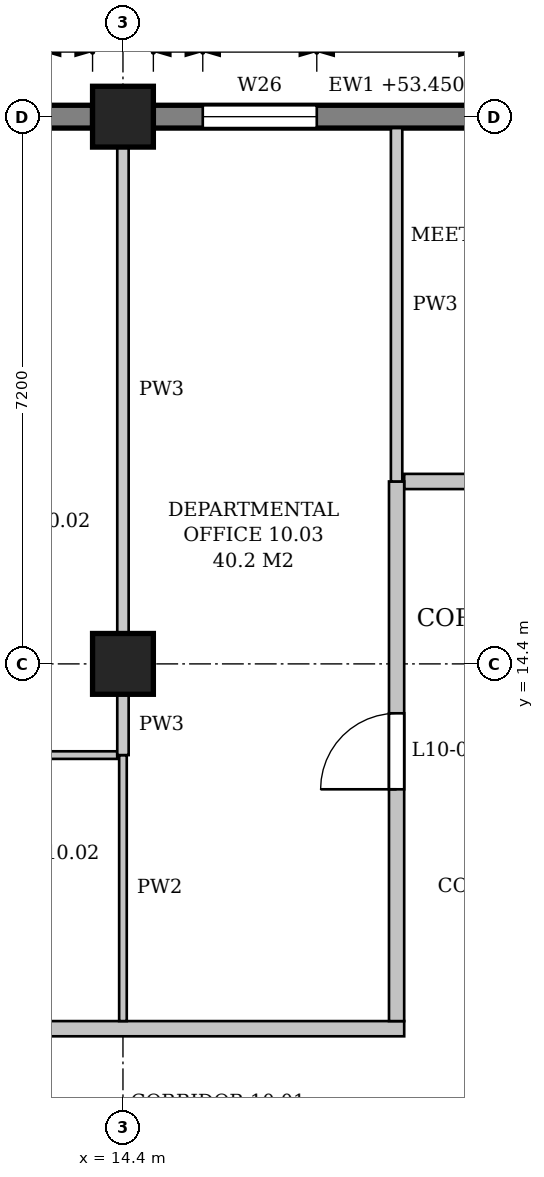
"""IFC4 building model, lengths in metres.
Left out: names, types, materials, properties, quantities, classifications, styles, units other than length and angle.
Written with IfcOpenShell. Run it as: python <this file> out.ifc"""

import sys

from ifc_helpers import new_model, si_unit, direction, frame, frame_2d, origin, origin_2d, place, context, subcontext, project, spatial, polyline, rectangle, outline, extrude, element, fill, save


model = new_model("IFC4")
c1 = context("Model", 3, precision=1e-05, world=origin(), true_north=direction((0.0, 1.0)))
c2 = subcontext(c1, "Body", "Model", "MODEL_VIEW")
j1 = project(units=[si_unit("LENGTHUNIT", "METRE"), si_unit("PLANEANGLEUNIT", "RADIAN")], contexts=[c1])
p1 = place(None, origin())
s1 = spatial("IfcSite", under=j1, at=p1, CompositionType="ELEMENT")
p2 = place(p1, origin())
s2 = spatial("IfcBuilding", under=s1, at=p2, CompositionType="ELEMENT")
p3 = place(p2, frame((0.0, 0.0, 49.8)))
s3 = spatial("IfcBuildingStorey", under=s2, at=p3, CompositionType="ELEMENT", Elevation=49.8)
for number, where, z_axis, x_axis in (
    (1, (14.4, 14.4, 0.0), (0.0, 0.0, 1.0), (1.0, 0.0, 0.0)),
    (2, (14.4, 21.6, 0.0), (0.0, 0.0, 1.0), (1.0, 0.0, 0.0)),
):
    element("IfcColumn", number, at=place(p3, frame(where, z_axis=z_axis, x_axis=x_axis)), inside=s3, PredefinedType="COLUMN", context=c2, shape_type="SweptSolid", body=[
        extrude(rectangle(XDim=0.8, YDim=0.8, at=origin_2d()), origin(), (0.0, 0.0, 1.0), 4.5),
    ])
p4 = place(p3, frame((21.2, 21.6, 0.0), z_axis=(0.0, 0.0, 1.0), x_axis=(-1.0, 0.0, 0.0)))
e3 = element("IfcWall", 3, at=p4, inside=s3, PredefinedType="STANDARD", context=c2, shape_type="SweptSolid", body=[
    extrude(rectangle(XDim=6.4, YDim=0.3, at=frame_2d((3.2, 0.0))), origin(), (0.0, 0.0, 1.0), 3.65),
])
p5 = place(p4, frame((0.65, 0.0, 0.9)))
e4 = element("IfcOpeningElement", 4, at=p5, cuts=e3, PredefinedType="OPENING", context=c2, shape_type="SweptSolid", body=[
    extrude(outline(polyline([(0.0, 0.0), (1.5, 0.0), (1.5, 1.85), (0.75, 2.6), (0.0, 1.85), (0.0, 0.0)])), frame((0.0, 0.16, 0.0), z_axis=(0.0, -1.0, 0.0), x_axis=(1.0, 0.0, 0.0)), (0.0, 0.0, 1.0), 0.32),
])
p6 = place(p4, frame((4.25, 0.0, 0.9)))
e5 = element("IfcOpeningElement", 5, at=p6, cuts=e3, PredefinedType="OPENING", context=c2, shape_type="SweptSolid", body=[
    extrude(outline(polyline([(0.0, 0.0), (1.5, 0.0), (1.5, 1.85), (0.75, 2.6), (0.0, 1.85), (0.0, 0.0)])), frame((0.0, 0.16, 0.0), z_axis=(0.0, -1.0, 0.0), x_axis=(1.0, 0.0, 0.0)), (0.0, 0.0, 1.0), 0.32),
])
p7 = place(p3, frame((14.0, 21.6, 0.0), z_axis=(0.0, 0.0, 1.0), x_axis=(-1.0, 0.0, 0.0)))
e6 = element("IfcWall", 6, at=p7, inside=s3, PredefinedType="STANDARD", context=c2, shape_type="SweptSolid", body=[
    extrude(rectangle(XDim=6.4, YDim=0.3, at=frame_2d((3.2, 0.0))), origin(), (0.0, 0.0, 1.0), 3.65),
])
p8 = place(p7, frame((0.65, 0.0, 0.9)))
e7 = element("IfcOpeningElement", 7, at=p8, cuts=e6, PredefinedType="OPENING", context=c2, shape_type="SweptSolid", body=[
    extrude(outline(polyline([(0.0, 0.0), (1.5, 0.0), (1.5, 1.85), (0.75, 2.6), (0.0, 1.85), (0.0, 0.0)])), frame((0.0, 0.16, 0.0), z_axis=(0.0, -1.0, 0.0), x_axis=(1.0, 0.0, 0.0)), (0.0, 0.0, 1.0), 0.32),
])
p9 = place(p7, frame((4.25, 0.0, 0.9)))
e8 = element("IfcOpeningElement", 8, at=p9, cuts=e6, PredefinedType="OPENING", context=c2, shape_type="SweptSolid", body=[
    extrude(outline(polyline([(0.0, 0.0), (1.5, 0.0), (1.5, 1.85), (0.75, 2.6), (0.0, 1.85), (0.0, 0.0)])), frame((0.0, 0.16, 0.0), z_axis=(0.0, -1.0, 0.0), x_axis=(1.0, 0.0, 0.0)), (0.0, 0.0, 1.0), 0.32),
])
p10 = place(p3, frame((3.5, 9.6, 0.0), z_axis=(0.0, 0.0, 1.0), x_axis=(1.0, 0.0, 0.0)))
e9 = element("IfcWall", 9, at=p10, inside=s3, PredefinedType="PARTITIONING", context=c2, shape_type="SweptSolid", body=[
    extrude(outline(polyline([(0.0, 0.0), (14.6, 0.0), (14.6, 4.25), (11.125, 4.25), (11.125, 3.55), (10.675, 3.55), (10.675, 4.25), (3.925, 4.25), (3.925, 3.55), (3.475, 3.55), (3.475, 4.25), (0.0, 4.25), (0.0, 0.0)])), frame((0.0, 0.1, 0.0), z_axis=(0.0, -1.0, 0.0), x_axis=(1.0, 0.0, 0.0)), (0.0, 0.0, 1.0), 0.2),
])
p11 = place(p10, frame((1.4, 0.0, 0.0)))
e10 = element("IfcOpeningElement", 10, at=p11, cuts=e9, PredefinedType="OPENING", context=c2, shape_type="SweptSolid", body=[
    extrude(rectangle(XDim=1.0, YDim=2.1, at=frame_2d((0.5, 1.05))), frame((0.0, 0.11, 0.0), z_axis=(0.0, -1.0, 0.0), x_axis=(1.0, 0.0, 0.0)), (0.0, 0.0, 1.0), 0.22),
])
p12 = place(p10, frame((6.8, 0.0, 0.0)))
e11 = element("IfcOpeningElement", 11, at=p12, cuts=e9, PredefinedType="OPENING", context=c2, shape_type="SweptSolid", body=[
    extrude(rectangle(XDim=1.0, YDim=2.1, at=frame_2d((0.5, 1.05))), frame((0.0, 0.11, 0.0), z_axis=(0.0, -1.0, 0.0), x_axis=(1.0, 0.0, 0.0)), (0.0, 0.0, 1.0), 0.22),
])
p13 = place(p3, frame((7.3, 13.2, 0.0), z_axis=(0.0, 0.0, 1.0), x_axis=(1.0, 0.0, 0.0)))
e12 = element("IfcWall", 12, at=p13, inside=s3, PredefinedType="PARTITIONING", context=c2, shape_type="SweptSolid", body=[
    extrude(rectangle(XDim=7.025, YDim=0.1, at=frame_2d((3.512, 0.0))), origin(), (0.0, 0.0, 1.0), 3.55),
])
p14 = place(p13, frame((1.25, 0.0, 0.0)))
e13 = element("IfcOpeningElement", 13, at=p14, cuts=e12, PredefinedType="OPENING", context=c2, shape_type="SweptSolid", body=[
    extrude(rectangle(XDim=1.0, YDim=2.1, at=frame_2d((0.5, 1.05))), frame((0.0, 0.06, 0.0), z_axis=(0.0, -1.0, 0.0), x_axis=(1.0, 0.0, 0.0)), (0.0, 0.0, 1.0), 0.12),
])
p15 = place(p13, frame((4.762, 0.0, 0.0)))
e14 = element("IfcOpeningElement", 14, at=p15, cuts=e12, PredefinedType="OPENING", context=c2, shape_type="SweptSolid", body=[
    extrude(rectangle(XDim=1.0, YDim=2.1, at=frame_2d((0.5, 1.05))), frame((0.0, 0.06, 0.0), z_axis=(0.0, -1.0, 0.0), x_axis=(1.0, 0.0, 0.0)), (0.0, 0.0, 1.0), 0.12),
])
p16 = place(p3, frame((18.1, 16.8, 0.0), z_axis=(0.0, 0.0, 1.0), x_axis=(1.0, 0.0, 0.0)))
e15 = element("IfcWall", 15, at=p16, inside=s3, PredefinedType="PARTITIONING", context=c2, shape_type="SweptSolid", body=[
    extrude(outline(polyline([(0.0, 0.0), (3.4, 0.0), (3.4, 3.55), (3.275, 3.55), (3.275, 4.25), (0.0, 4.25), (0.0, 0.0)])), frame((0.0, 0.1, 0.0), z_axis=(0.0, -1.0, 0.0), x_axis=(1.0, 0.0, 0.0)), (0.0, 0.0, 1.0), 0.2),
])
p17 = place(p16, frame((1.2, 0.0, 0.0)))
e16 = element("IfcOpeningElement", 16, at=p17, cuts=e15, PredefinedType="OPENING", context=c2, shape_type="SweptSolid", body=[
    extrude(rectangle(XDim=1.0, YDim=2.1, at=frame_2d((0.5, 1.05))), frame((0.0, 0.11, 0.0), z_axis=(0.0, -1.0, 0.0), x_axis=(1.0, 0.0, 0.0)), (0.0, 0.0, 1.0), 0.22),
])
p18 = place(p3, frame((14.4, 9.7, 0.0), z_axis=(0.0, 0.0, 1.0), x_axis=(0.0, 1.0, 0.0)))
e17 = element("IfcWall", 17, at=p18, inside=s3, PredefinedType="PARTITIONING", context=c2, shape_type="SweptSolid", body=[
    extrude(rectangle(XDim=3.5, YDim=0.1, at=frame_2d((1.75, 0.0))), origin(), (0.0, 0.0, 1.0), 3.55),
])
p19 = place(p3, frame((14.4, 13.2, 0.0), z_axis=(0.0, 0.0, 1.0), x_axis=(0.0, 1.0, 0.0)))
e18 = element("IfcWall", 18, at=p19, inside=s3, PredefinedType="PARTITIONING", context=c2, shape_type="SweptSolid", body=[
    extrude(rectangle(XDim=0.8, YDim=0.15, at=frame_2d((0.4, 0.0))), origin(), (0.0, 0.0, 1.0), 3.55),
])
p20 = place(p3, frame((14.4, 14.8, 0.0), z_axis=(0.0, 0.0, 1.0), x_axis=(0.0, 1.0, 0.0)))
e19 = element("IfcWall", 19, at=p20, inside=s3, PredefinedType="PARTITIONING", context=c2, shape_type="SweptSolid", body=[
    extrude(rectangle(XDim=6.4, YDim=0.15, at=frame_2d((3.2, 0.0))), origin(), (0.0, 0.0, 1.0), 3.55),
])
p21 = place(p3, frame((18.0, 9.7, 0.0), z_axis=(0.0, 0.0, 1.0), x_axis=(0.0, 1.0, 0.0)))
e20 = element("IfcWall", 20, at=p21, inside=s3, PredefinedType="PARTITIONING", context=c2, shape_type="SweptSolid", body=[
    extrude(outline(polyline([(0.0, 0.0), (7.1, 0.0), (7.1, 4.25), (4.925, 4.25), (4.925, 3.55), (4.475, 3.55), (4.475, 4.25), (0.0, 4.25), (0.0, 0.0)])), frame((0.0, 0.1, 0.0), z_axis=(0.0, -1.0, 0.0), x_axis=(1.0, 0.0, 0.0)), (0.0, 0.0, 1.0), 0.2),
])
p22 = place(p21, frame((3.05, 0.0, 0.0)))
e21 = element("IfcOpeningElement", 21, at=p22, cuts=e20, PredefinedType="OPENING", context=c2, shape_type="SweptSolid", body=[
    extrude(rectangle(XDim=1.0, YDim=2.1, at=frame_2d((0.5, 1.05))), frame((0.0, 0.11, 0.0), z_axis=(0.0, -1.0, 0.0), x_axis=(1.0, 0.0, 0.0)), (0.0, 0.0, 1.0), 0.22),
])
p23 = place(p3, frame((18.0, 16.8, 0.0), z_axis=(0.0, 0.0, 1.0), x_axis=(0.0, 1.0, 0.0)))
e22 = element("IfcWall", 22, at=p23, inside=s3, PredefinedType="PARTITIONING", context=c2, shape_type="SweptSolid", body=[
    extrude(rectangle(XDim=4.65, YDim=0.15, at=frame_2d((2.325, 0.0))), origin(), (0.0, 0.0, 1.0), 3.55),
])
p24 = place(p6, origin())
e23 = element("IfcWindow", 23, at=p24, inside=s3, PartitioningType="SINGLE_PANEL", PredefinedType="WINDOW", context=c2, shape_type="SweptSolid", body=[
    extrude(outline(polyline([(0.0, 0.0), (1.5, 0.0), (1.5, 1.85), (0.75, 2.6), (0.0, 1.85), (0.0, 0.0)])), frame((0.0, 0.03, 0.0), z_axis=(0.0, -1.0, 0.0), x_axis=(1.0, 0.0, 0.0)), (0.0, 0.0, 1.0), 0.06),
])
fill(e5, e23)
p25 = place(p22, origin())
e24 = element("IfcDoor", 24, at=p25, inside=s3, OperationType="SINGLE_SWING_LEFT", PredefinedType="DOOR", context=c2, shape_type="SweptSolid", body=[
    extrude(rectangle(XDim=1.0, YDim=2.1, at=frame_2d((0.5, 1.05))), frame((0.0, 0.025, 0.0), z_axis=(0.0, -1.0, 0.0), x_axis=(1.0, 0.0, 0.0)), (0.0, 0.0, 1.0), 0.05),
])
fill(e21, e24)
save(model, sys.argv[1])
